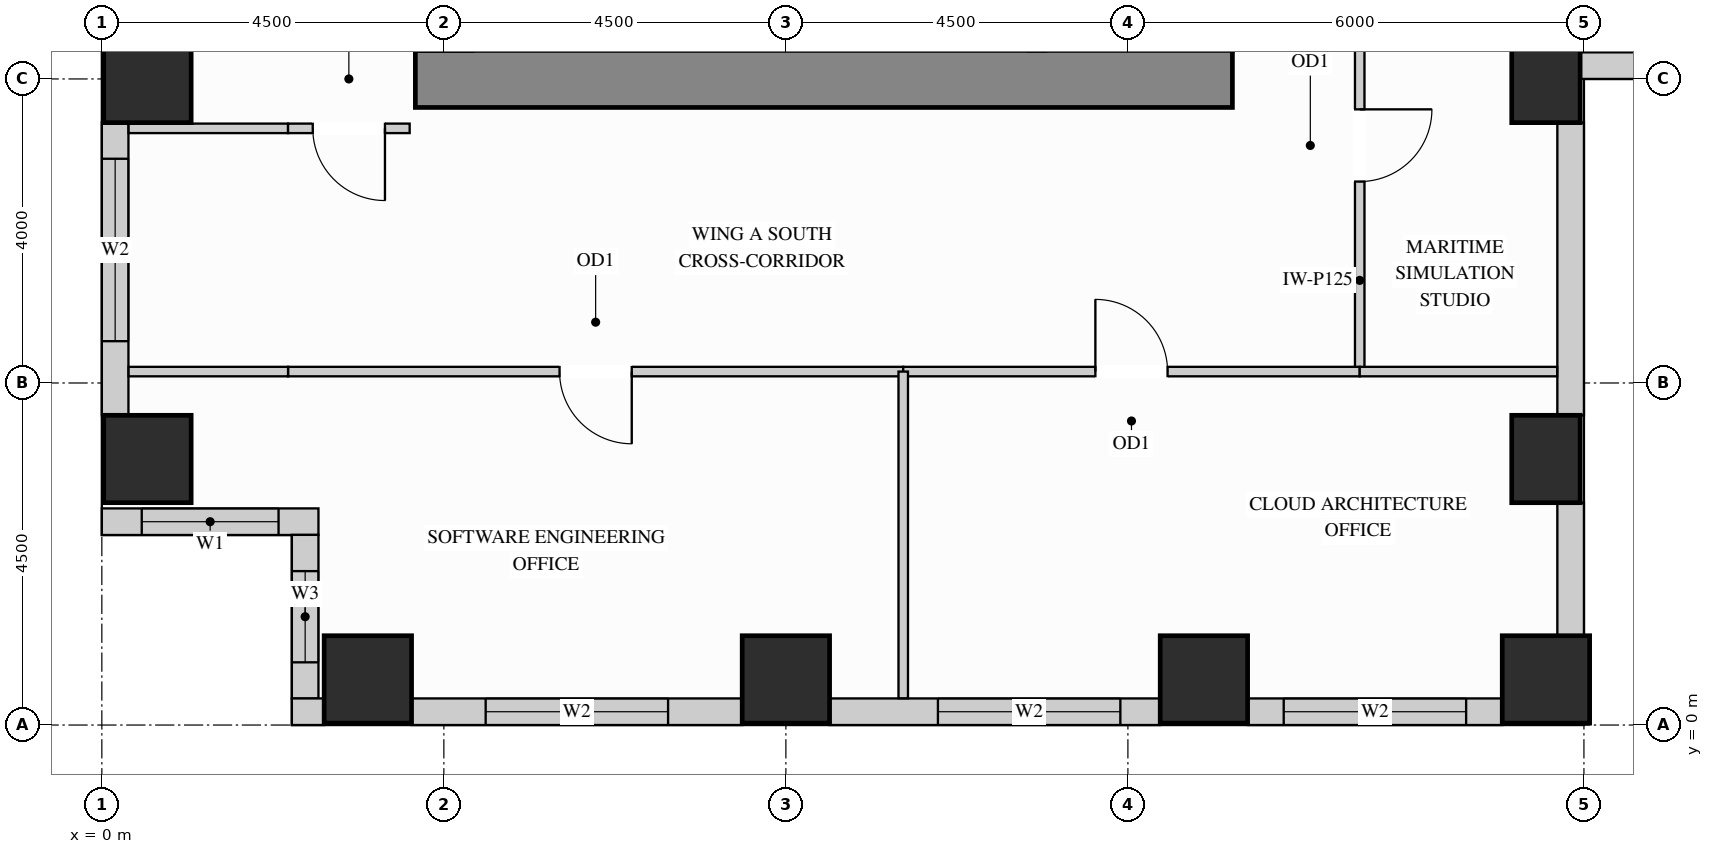
"""IFC4 building model, lengths in metres.
Left out: names, types, materials, properties, quantities, classifications, styles, units other than length and angle.
Written with IfcOpenShell. Run it as: python <this file> out.ifc"""

import sys

from ifc_helpers import new_model, si_unit, direction, frame, frame_2d, origin, origin_2d, place, context, subcontext, project, spatial, rectangle, extrude, source, transform, mapped, element, fill, save


model = new_model("IFC4")
c1 = context("Model", 3, precision=1e-05, world=origin(), true_north=direction((0.0, 1.0)))
c2 = subcontext(c1, "Body", "Model", "MODEL_VIEW")
j1 = project(units=[si_unit("LENGTHUNIT", "METRE"), si_unit("PLANEANGLEUNIT", "RADIAN")], contexts=[c1])
p1 = place(None, origin())
s1 = spatial("IfcSite", under=j1, at=p1, CompositionType="ELEMENT")
p2 = place(p1, origin())
s2 = spatial("IfcBuilding", under=s1, at=p2, CompositionType="ELEMENT")
p3 = place(p2, frame((0.0, 0.0, 127.8)))
s3 = spatial("IfcBuildingStorey", under=s2, at=p3, CompositionType="ELEMENT", Elevation=127.8)
m1 = source(origin(), c2, "Body", "SweptSolid", [
    extrude(rectangle(XDim=0.9, YDim=1.15, at=origin_2d()), origin(), (0.0, 0.0, 1.0), 3.38),
])
for number, where, z_axis, x_axis in (
    (1, (19.0, 3.5, 0.0), (0.0, 0.0, 1.0), (1.0, 0.0, 0.0)),
    (2, (19.0, 8.5, 0.0), (0.0, 0.0, 1.0), (1.0, 0.0, 0.0)),
):
    element("IfcColumn", number, at=place(p3, frame(where, z_axis=z_axis, x_axis=x_axis)), inside=s3, PredefinedType="COLUMN", context=c2, shape_type="MappedRepresentation", body=[
        mapped(m1, transform((0.0, 0.0, 0.0), x_axis=(1.0, 0.0, 0.0), y_axis=(0.0, 1.0, 0.0), z_axis=(0.0, 0.0, 1.0))),
    ])
m2 = source(origin(), c2, "Body", "SweptSolid", [
    extrude(rectangle(XDim=1.15, YDim=1.15, at=origin_2d()), origin(), (0.0, 0.0, 1.0), 3.38),
])
for number, where, z_axis, x_axis in (
    (3, (14.5, 0.6, 0.0), (0.0, 0.0, 1.0), (1.0, 0.0, 0.0)),
    (4, (19.0, 0.6, 0.0), (0.0, 0.0, 1.0), (1.0, 0.0, 0.0)),
    (5, (3.5, 0.6, 0.0), (0.0, 0.0, 1.0), (1.0, 0.0, 0.0)),
    (6, (9.0, 0.6, 0.0), (0.0, 0.0, 1.0), (1.0, 0.0, 0.0)),
    (7, (0.6, 3.5, 0.0), (0.0, 0.0, 1.0), (1.0, 0.0, 0.0)),
    (8, (0.6, 8.5, 0.0), (0.0, 0.0, 1.0), (1.0, 0.0, 0.0)),
):
    element("IfcColumn", number, at=place(p3, frame(where, z_axis=z_axis, x_axis=x_axis)), inside=s3, PredefinedType="COLUMN", context=c2, shape_type="MappedRepresentation", body=[
        mapped(m2, transform((0.0, 0.0, 0.0), x_axis=(1.0, 0.0, 0.0), y_axis=(0.0, 1.0, 0.0), z_axis=(0.0, 0.0, 1.0))),
    ])
m3 = source(origin(), c2, "Body", "SweptSolid", [
    extrude(rectangle(XDim=10.75, YDim=0.75, at=frame_2d((5.375, 0.0))), origin(), (0.0, 0.0, 1.0), 3.38),
])
p4 = place(p3, frame((4.125, 8.5, 0.0), z_axis=(0.0, 0.0, 1.0), x_axis=(1.0, 0.0, 0.0)))
e9 = element("IfcWall", 9, at=p4, inside=s3, PredefinedType="SHEAR", context=c2, shape_type="MappedRepresentation", body=[
    mapped(m3, transform((0.0, 0.0, 0.0), x_axis=(1.0, 0.0, 0.0), y_axis=(0.0, 1.0, 0.0), z_axis=(0.0, 0.0, 1.0))),
])
p5 = place(p3, frame((0.175, 7.927, 0.0), z_axis=(0.0, 0.0, 1.0), x_axis=(0.0, -1.0, 0.0)))
e10 = element("IfcWall", 10, at=p5, inside=s3, PredefinedType="SOLIDWALL", context=c2, shape_type="SweptSolid", body=[
    extrude(rectangle(XDim=3.854, YDim=0.35, at=frame_2d((1.927, 0.0))), origin(), (0.0, 0.0, 1.0), 3.365),
])
p6 = place(p5, frame((0.477, 0.0, 0.78)))
e11 = element("IfcOpeningElement", 11, at=p6, cuts=e10, PredefinedType="OPENING", context=c2, shape_type="SweptSolid", body=[
    extrude(rectangle(XDim=2.4, YDim=2.1, at=frame_2d((1.2, 1.05))), frame((0.0, 0.185, 0.0), z_axis=(0.0, -1.0, 0.0), x_axis=(1.0, 0.0, 0.0)), (0.0, 0.0, 1.0), 0.37),
])
p7 = place(p3, frame((0.0, 2.675, 0.0), z_axis=(0.0, 0.0, 1.0), x_axis=(1.0, 0.0, 0.0)))
e12 = element("IfcWall", 12, at=p7, inside=s3, PredefinedType="SOLIDWALL", context=c2, shape_type="SweptSolid", body=[
    extrude(rectangle(XDim=2.85, YDim=0.35, at=frame_2d((1.425, 0.0))), origin(), (0.0, 0.0, 1.0), 3.365),
])
p8 = place(p7, frame((0.525, 0.0, 0.78)))
e13 = element("IfcOpeningElement", 13, at=p8, cuts=e12, PredefinedType="OPENING", context=c2, shape_type="SweptSolid", body=[
    extrude(rectangle(XDim=1.8, YDim=2.1, at=frame_2d((0.9, 1.05))), frame((0.0, 0.185, 0.0), z_axis=(0.0, -1.0, 0.0), x_axis=(1.0, 0.0, 0.0)), (0.0, 0.0, 1.0), 0.37),
])
p9 = place(p3, frame((2.675, 2.502, 0.0), z_axis=(0.0, 0.0, 1.0), x_axis=(0.0, -1.0, 0.0)))
e14 = element("IfcWall", 14, at=p9, inside=s3, PredefinedType="SOLIDWALL", context=c2, shape_type="SweptSolid", body=[
    extrude(rectangle(XDim=2.154, YDim=0.35, at=frame_2d((1.077, 0.0))), origin(), (0.0, 0.0, 1.0), 3.365),
])
p10 = place(p9, frame((0.477, 0.0, 0.78)))
e15 = element("IfcOpeningElement", 15, at=p10, cuts=e14, PredefinedType="OPENING", context=c2, shape_type="SweptSolid", body=[
    extrude(rectangle(XDim=1.2, YDim=2.1, at=frame_2d((0.6, 1.05))), frame((0.0, 0.185, 0.0), z_axis=(0.0, -1.0, 0.0), x_axis=(1.0, 0.0, 0.0)), (0.0, 0.0, 1.0), 0.37),
])
m4 = source(origin(), c2, "Body", "SweptSolid", [
    extrude(rectangle(XDim=0.427, YDim=0.35, at=frame_2d((0.213, 0.0))), origin(), (0.0, 0.0, 1.0), 3.365),
])
p11 = place(p3, frame((2.5, 0.175, 0.0), z_axis=(0.0, 0.0, 1.0), x_axis=(1.0, 0.0, 0.0)))
e16 = element("IfcWall", 16, at=p11, inside=s3, PredefinedType="SOLIDWALL", context=c2, shape_type="MappedRepresentation", body=[
    mapped(m4, transform((0.0, 0.0, 0.0), x_axis=(1.0, 0.0, 0.0), y_axis=(0.0, 1.0, 0.0), z_axis=(0.0, 0.0, 1.0))),
])
p12 = place(p3, frame((4.073, 0.175, 0.0), z_axis=(0.0, 0.0, 1.0), x_axis=(1.0, 0.0, 0.0)))
e17 = element("IfcWall", 17, at=p12, inside=s3, PredefinedType="SOLIDWALL", context=c2, shape_type="SweptSolid", body=[
    extrude(rectangle(XDim=4.354, YDim=0.35, at=frame_2d((2.177, 0.0))), origin(), (0.0, 0.0, 1.0), 3.365),
])
p13 = place(p12, frame((0.977, 0.0, 0.78)))
e18 = element("IfcOpeningElement", 18, at=p13, cuts=e17, PredefinedType="OPENING", context=c2, shape_type="SweptSolid", body=[
    extrude(rectangle(XDim=2.4, YDim=2.1, at=frame_2d((1.2, 1.05))), frame((0.0, 0.185, 0.0), z_axis=(0.0, -1.0, 0.0), x_axis=(1.0, 0.0, 0.0)), (0.0, 0.0, 1.0), 0.37),
])
p14 = place(p3, frame((9.573, 0.175, 0.0), z_axis=(0.0, 0.0, 1.0), x_axis=(1.0, 0.0, 0.0)))
e19 = element("IfcWall", 19, at=p14, inside=s3, PredefinedType="SOLIDWALL", context=c2, shape_type="SweptSolid", body=[
    extrude(rectangle(XDim=4.354, YDim=0.35, at=frame_2d((2.177, 0.0))), origin(), (0.0, 0.0, 1.0), 3.365),
])
p15 = place(p14, frame((1.427, 0.0, 0.78)))
e20 = element("IfcOpeningElement", 20, at=p15, cuts=e19, PredefinedType="OPENING", context=c2, shape_type="SweptSolid", body=[
    extrude(rectangle(XDim=2.4, YDim=2.1, at=frame_2d((1.2, 1.05))), frame((0.0, 0.185, 0.0), z_axis=(0.0, -1.0, 0.0), x_axis=(1.0, 0.0, 0.0)), (0.0, 0.0, 1.0), 0.37),
])
p16 = place(p3, frame((15.073, 0.175, 0.0), z_axis=(0.0, 0.0, 1.0), x_axis=(1.0, 0.0, 0.0)))
e21 = element("IfcWall", 21, at=p16, inside=s3, PredefinedType="SOLIDWALL", context=c2, shape_type="SweptSolid", body=[
    extrude(rectangle(XDim=3.354, YDim=0.35, at=frame_2d((1.677, 0.0))), origin(), (0.0, 0.0, 1.0), 3.365),
])
p17 = place(p16, frame((0.477, 0.0, 0.78)))
e22 = element("IfcOpeningElement", 22, at=p17, cuts=e21, PredefinedType="OPENING", context=c2, shape_type="SweptSolid", body=[
    extrude(rectangle(XDim=2.4, YDim=2.1, at=frame_2d((1.2, 1.05))), frame((0.0, 0.185, 0.0), z_axis=(0.0, -1.0, 0.0), x_axis=(1.0, 0.0, 0.0)), (0.0, 0.0, 1.0), 0.37),
])
m5 = source(origin(), c2, "Body", "SweptSolid", [
    extrude(rectangle(XDim=1.754, YDim=0.35, at=frame_2d((0.877, 0.0))), origin(), (0.0, 0.0, 1.0), 2.519),
])
p18 = place(p3, frame((19.325, 1.173, 0.0), z_axis=(0.0, 0.0, 1.0), x_axis=(0.0, 1.0, 0.0)))
e23 = element("IfcWall", 23, at=p18, inside=s3, PredefinedType="SOLIDWALL", context=c2, shape_type="MappedRepresentation", body=[
    mapped(m5, transform((0.0, 0.0, 0.0), x_axis=(1.0, 0.0, 0.0), y_axis=(0.0, 1.0, 0.0), z_axis=(0.0, 0.0, 1.0))),
])
m6 = source(origin(), c2, "Body", "SweptSolid", [
    extrude(rectangle(XDim=3.854, YDim=0.35, at=frame_2d((1.927, 0.0))), origin(), (0.0, 0.0, 1.0), 2.519),
])
p19 = place(p3, frame((19.325, 4.073, 0.0), z_axis=(0.0, 0.0, 1.0), x_axis=(0.0, 1.0, 0.0)))
e24 = element("IfcWall", 24, at=p19, inside=s3, PredefinedType="SOLIDWALL", context=c2, shape_type="MappedRepresentation", body=[
    mapped(m6, transform((0.0, 0.0, 0.0), x_axis=(1.0, 0.0, 0.0), y_axis=(0.0, 1.0, 0.0), z_axis=(0.0, 0.0, 1.0))),
])
p20 = place(p3, frame((19.448, 8.675, 0.0), z_axis=(0.0, 0.0, 1.0), x_axis=(1.0, 0.0, 0.0)))
e25 = element("IfcWall", 25, at=p20, inside=s3, PredefinedType="SOLIDWALL", context=c2, shape_type="SweptSolid", body=[
    extrude(rectangle(XDim=3.504, YDim=0.35, at=frame_2d((1.752, 0.0))), origin(), (0.0, 0.0, 1.0), 3.365),
])
p21 = place(p20, frame((1.002, 0.0, 0.78)))
e26 = element("IfcOpeningElement", 26, at=p21, cuts=e25, PredefinedType="OPENING", context=c2, shape_type="SweptSolid", body=[
    extrude(rectangle(XDim=1.5, YDim=2.0, at=frame_2d((0.75, 1.0))), frame((0.0, 0.185, 0.0), z_axis=(0.0, -1.0, 0.0), x_axis=(1.0, 0.0, 0.0)), (0.0, 0.0, 1.0), 0.37),
])
p22 = place(p3, frame((16.55, 4.65, 0.0), z_axis=(0.0, 0.0, 1.0), x_axis=(0.0, 1.0, 0.0)))
e27 = element("IfcWall", 27, at=p22, inside=s3, PredefinedType="PARTITIONING", context=c2, shape_type="SweptSolid", body=[
    extrude(rectangle(XDim=5.95, YDim=0.125, at=frame_2d((2.975, 0.0))), origin(), (0.0, 0.0, 1.0), 3.365),
])
p23 = place(p22, frame((2.5, 0.0, 0.0)))
e28 = element("IfcOpeningElement", 28, at=p23, cuts=e27, PredefinedType="OPENING", context=c2, shape_type="SweptSolid", body=[
    extrude(rectangle(XDim=0.95, YDim=2.15, at=frame_2d((0.475, 1.075))), frame((0.0, 0.073, 0.0), z_axis=(0.0, -1.0, 0.0), x_axis=(1.0, 0.0, 0.0)), (0.0, 0.0, 1.0), 0.145),
])
m7 = source(origin(), c2, "Body", "SweptSolid", [
    extrude(rectangle(XDim=2.098, YDim=0.125, at=frame_2d((1.049, 0.0))), origin(), (0.0, 0.0, 1.0), 3.365),
])
p24 = place(p3, frame((0.352, 7.85, 0.0), z_axis=(0.0, 0.0, 1.0), x_axis=(1.0, 0.0, 0.0)))
e29 = element("IfcWall", 29, at=p24, inside=s3, PredefinedType="PARTITIONING", context=c2, shape_type="MappedRepresentation", body=[
    mapped(m7, transform((0.0, 0.0, 0.0), x_axis=(1.0, 0.0, 0.0), y_axis=(0.0, 1.0, 0.0), z_axis=(0.0, 0.0, 1.0))),
])
p25 = place(p3, frame((2.45, 7.85, 0.0), z_axis=(0.0, 0.0, 1.0), x_axis=(1.0, 0.0, 0.0)))
e30 = element("IfcWall", 30, at=p25, inside=s3, PredefinedType="PARTITIONING", context=c2, shape_type="SweptSolid", body=[
    extrude(rectangle(XDim=1.6, YDim=0.125, at=frame_2d((0.8, 0.0))), origin(), (0.0, 0.0, 1.0), 3.365),
])
p26 = place(p25, frame((0.325, 0.0, 0.0)))
e31 = element("IfcOpeningElement", 31, at=p26, cuts=e30, PredefinedType="OPENING", context=c2, shape_type="SweptSolid", body=[
    extrude(rectangle(XDim=0.95, YDim=2.15, at=frame_2d((0.475, 1.075))), frame((0.0, 0.073, 0.0), z_axis=(0.0, -1.0, 0.0), x_axis=(1.0, 0.0, 0.0)), (0.0, 0.0, 1.0), 0.145),
])
p27 = place(p3, frame((2.45, 4.65, 0.0), z_axis=(0.0, 0.0, 1.0), x_axis=(1.0, 0.0, 0.0)))
e32 = element("IfcWall", 32, at=p27, inside=s3, PredefinedType="PARTITIONING", context=c2, shape_type="SweptSolid", body=[
    extrude(rectangle(XDim=8.094, YDim=0.125, at=frame_2d((4.047, 0.0))), origin(), (0.0, 0.0, 1.0), 2.828),
])
p28 = place(p27, frame((3.572, 0.0, 0.0)))
e33 = element("IfcOpeningElement", 33, at=p28, cuts=e32, PredefinedType="OPENING", context=c2, shape_type="SweptSolid", body=[
    extrude(rectangle(XDim=0.95, YDim=2.15, at=frame_2d((0.475, 1.075))), frame((0.0, 0.073, 0.0), z_axis=(0.0, -1.0, 0.0), x_axis=(1.0, 0.0, 0.0)), (0.0, 0.0, 1.0), 0.145),
])
p29 = place(p3, frame((10.544, 4.65, 0.0), z_axis=(0.0, 0.0, 1.0), x_axis=(1.0, 0.0, 0.0)))
e34 = element("IfcWall", 34, at=p29, inside=s3, PredefinedType="PARTITIONING", context=c2, shape_type="SweptSolid", body=[
    extrude(rectangle(XDim=6.006, YDim=0.125, at=frame_2d((3.003, 0.0))), origin(), (0.0, 0.0, 1.0), 2.828),
])
p30 = place(p29, frame((2.528, 0.0, 0.0)))
e35 = element("IfcOpeningElement", 35, at=p30, cuts=e34, PredefinedType="OPENING", context=c2, shape_type="SweptSolid", body=[
    extrude(rectangle(XDim=0.95, YDim=2.15, at=frame_2d((0.475, 1.075))), frame((0.0, 0.073, 0.0), z_axis=(0.0, -1.0, 0.0), x_axis=(1.0, 0.0, 0.0)), (0.0, 0.0, 1.0), 0.145),
])
m8 = source(origin(), c2, "Body", "SweptSolid", [
    extrude(rectangle(XDim=2.098, YDim=0.125, at=frame_2d((1.049, 0.0))), origin(), (0.0, 0.0, 1.0), 2.828),
])
p31 = place(p3, frame((0.352, 4.65, 0.0), z_axis=(0.0, 0.0, 1.0), x_axis=(1.0, 0.0, 0.0)))
e36 = element("IfcWall", 36, at=p31, inside=s3, PredefinedType="PARTITIONING", context=c2, shape_type="MappedRepresentation", body=[
    mapped(m8, transform((0.0, 0.0, 0.0), x_axis=(1.0, 0.0, 0.0), y_axis=(0.0, 1.0, 0.0), z_axis=(0.0, 0.0, 1.0))),
])
m9 = source(origin(), c2, "Body", "SweptSolid", [
    extrude(rectangle(XDim=2.598, YDim=0.125, at=frame_2d((1.299, 0.0))), origin(), (0.0, 0.0, 1.0), 2.828),
])
p32 = place(p3, frame((16.55, 4.65, 0.0), z_axis=(0.0, 0.0, 1.0), x_axis=(1.0, 0.0, 0.0)))
e37 = element("IfcWall", 37, at=p32, inside=s3, PredefinedType="PARTITIONING", context=c2, shape_type="MappedRepresentation", body=[
    mapped(m9, transform((0.0, 0.0, 0.0), x_axis=(1.0, 0.0, 0.0), y_axis=(0.0, 1.0, 0.0), z_axis=(0.0, 0.0, 1.0))),
])
m10 = source(origin(), c2, "Body", "SweptSolid", [
    extrude(rectangle(XDim=4.298, YDim=0.125, at=frame_2d((2.149, 0.0))), origin(), (0.0, 0.0, 1.0), 3.365),
])
p33 = place(p3, frame((10.544, 0.352, 0.0), z_axis=(0.0, 0.0, 1.0), x_axis=(0.0, 1.0, 0.0)))
e38 = element("IfcWall", 38, at=p33, inside=s3, PredefinedType="PARTITIONING", context=c2, shape_type="MappedRepresentation", body=[
    mapped(m10, transform((0.0, 0.0, 0.0), x_axis=(1.0, 0.0, 0.0), y_axis=(0.0, 1.0, 0.0), z_axis=(0.0, 0.0, 1.0))),
])
m11 = source(origin(), c2, "Body", "SweptSolid", [
    extrude(rectangle(XDim=0.95, YDim=2.15, at=frame_2d((0.475, 1.075))), frame((0.0, 0.025, 0.0), z_axis=(0.0, -1.0, 0.0), x_axis=(1.0, 0.0, 0.0)), (0.0, 0.0, 1.0), 0.05),
])
p34 = place(p23, origin())
e39 = element("IfcDoor", 39, at=p34, inside=s3, OperationType="SINGLE_SWING_RIGHT", PredefinedType="DOOR", context=c2, shape_type="MappedRepresentation", body=[
    mapped(m11, transform((0.0, 0.0, 0.0), x_axis=(1.0, 0.0, 0.0), y_axis=(0.0, 1.0, 0.0), z_axis=(0.0, 0.0, 1.0))),
])
fill(e28, e39)
p35 = place(p28, origin())
e40 = element("IfcDoor", 40, at=p35, inside=s3, OperationType="SINGLE_SWING_RIGHT", PredefinedType="DOOR", context=c2, shape_type="MappedRepresentation", body=[
    mapped(m11, transform((0.0, 0.0, 0.0), x_axis=(1.0, 0.0, 0.0), y_axis=(0.0, 1.0, 0.0), z_axis=(0.0, 0.0, 1.0))),
])
fill(e33, e40)
p36 = place(p30, origin())
e41 = element("IfcDoor", 41, at=p36, inside=s3, OperationType="SINGLE_SWING_LEFT", PredefinedType="DOOR", context=c2, shape_type="MappedRepresentation", body=[
    mapped(m11, transform((0.0, 0.0, 0.0), x_axis=(1.0, 0.0, 0.0), y_axis=(0.0, 1.0, 0.0), z_axis=(0.0, 0.0, 1.0))),
])
fill(e35, e41)
p37 = place(p26, origin())
e42 = element("IfcDoor", 42, at=p37, inside=s3, OperationType="SINGLE_SWING_RIGHT", PredefinedType="DOOR", context=c2, shape_type="MappedRepresentation", body=[
    mapped(m11, transform((0.0, 0.0, 0.0), x_axis=(1.0, 0.0, 0.0), y_axis=(0.0, 1.0, 0.0), z_axis=(0.0, 0.0, 1.0))),
])
fill(e31, e42)
m12 = source(origin(), c2, "Body", "SweptSolid", [
    extrude(rectangle(XDim=1.8, YDim=2.1, at=frame_2d((0.9, 1.05))), frame((0.0, 0.03, 0.0), z_axis=(0.0, -1.0, 0.0), x_axis=(1.0, 0.0, 0.0)), (0.0, 0.0, 1.0), 0.06),
])
p38 = place(p8, origin())
e43 = element("IfcWindow", 43, at=p38, inside=s3, PartitioningType="SINGLE_PANEL", PredefinedType="WINDOW", context=c2, shape_type="MappedRepresentation", body=[
    mapped(m12, transform((0.0, 0.0, 0.0), x_axis=(1.0, 0.0, 0.0), y_axis=(0.0, 1.0, 0.0), z_axis=(0.0, 0.0, 1.0))),
])
fill(e13, e43)
m13 = source(origin(), c2, "Body", "SweptSolid", [
    extrude(rectangle(XDim=2.4, YDim=2.1, at=frame_2d((1.2, 1.05))), frame((0.0, 0.03, 0.0), z_axis=(0.0, -1.0, 0.0), x_axis=(1.0, 0.0, 0.0)), (0.0, 0.0, 1.0), 0.06),
])
p39 = place(p6, origin())
e44 = element("IfcWindow", 44, at=p39, inside=s3, PartitioningType="SINGLE_PANEL", PredefinedType="WINDOW", context=c2, shape_type="MappedRepresentation", body=[
    mapped(m13, transform((0.0, 0.0, 0.0), x_axis=(1.0, 0.0, 0.0), y_axis=(0.0, 1.0, 0.0), z_axis=(0.0, 0.0, 1.0))),
])
fill(e11, e44)
p40 = place(p13, origin())
e45 = element("IfcWindow", 45, at=p40, inside=s3, PartitioningType="SINGLE_PANEL", PredefinedType="WINDOW", context=c2, shape_type="MappedRepresentation", body=[
    mapped(m13, transform((0.0, 0.0, 0.0), x_axis=(1.0, 0.0, 0.0), y_axis=(0.0, 1.0, 0.0), z_axis=(0.0, 0.0, 1.0))),
])
fill(e18, e45)
p41 = place(p15, origin())
e46 = element("IfcWindow", 46, at=p41, inside=s3, PartitioningType="SINGLE_PANEL", PredefinedType="WINDOW", context=c2, shape_type="MappedRepresentation", body=[
    mapped(m13, transform((0.0, 0.0, 0.0), x_axis=(1.0, 0.0, 0.0), y_axis=(0.0, 1.0, 0.0), z_axis=(0.0, 0.0, 1.0))),
])
fill(e20, e46)
p42 = place(p17, origin())
e47 = element("IfcWindow", 47, at=p42, inside=s3, PartitioningType="SINGLE_PANEL", PredefinedType="WINDOW", context=c2, shape_type="MappedRepresentation", body=[
    mapped(m13, transform((0.0, 0.0, 0.0), x_axis=(1.0, 0.0, 0.0), y_axis=(0.0, 1.0, 0.0), z_axis=(0.0, 0.0, 1.0))),
])
fill(e22, e47)
m14 = source(origin(), c2, "Body", "SweptSolid", [
    extrude(rectangle(XDim=1.2, YDim=2.1, at=frame_2d((0.6, 1.05))), frame((0.0, 0.03, 0.0), z_axis=(0.0, -1.0, 0.0), x_axis=(1.0, 0.0, 0.0)), (0.0, 0.0, 1.0), 0.06),
])
p43 = place(p10, origin())
e48 = element("IfcWindow", 48, at=p43, inside=s3, PartitioningType="SINGLE_PANEL", PredefinedType="WINDOW", context=c2, shape_type="MappedRepresentation", body=[
    mapped(m14, transform((0.0, 0.0, 0.0), x_axis=(1.0, 0.0, 0.0), y_axis=(0.0, 1.0, 0.0), z_axis=(0.0, 0.0, 1.0))),
])
fill(e15, e48)
save(model, sys.argv[1])
